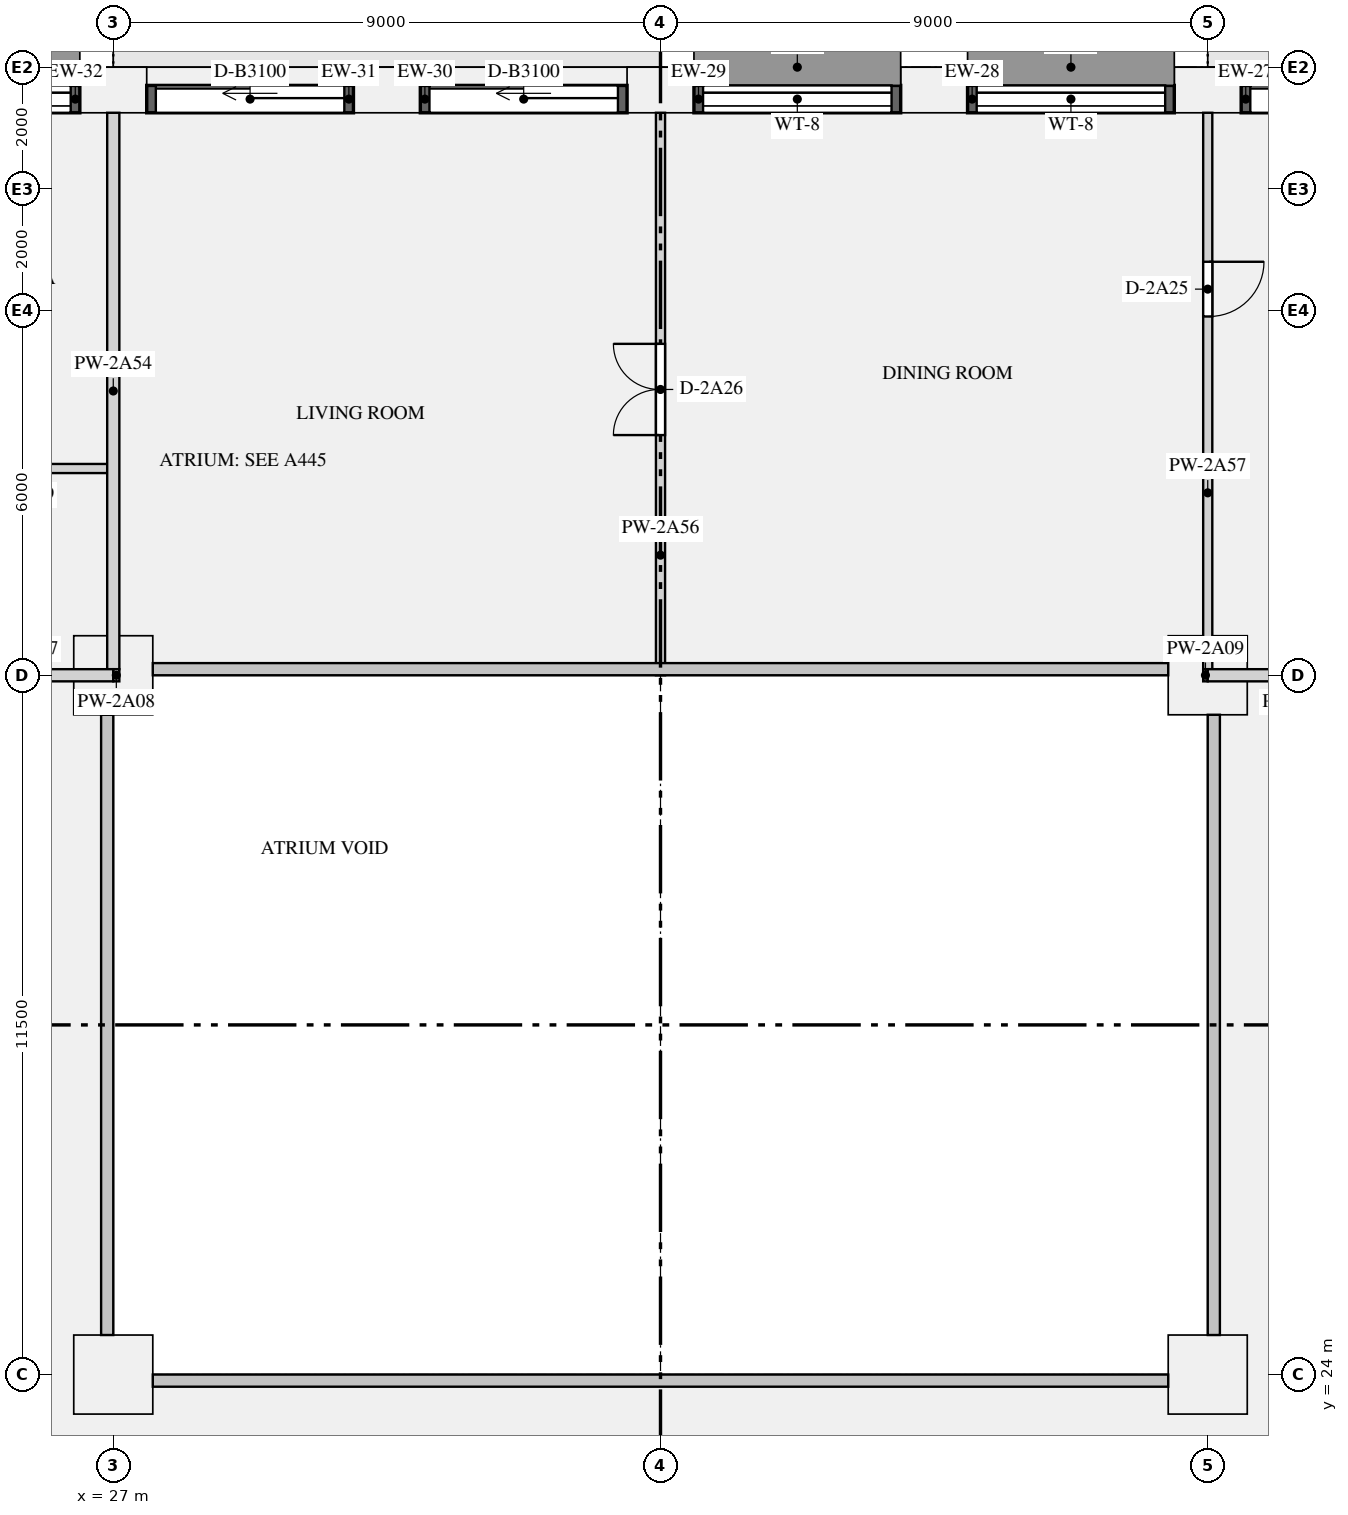
"""IFC4 building model, lengths in metres.
Left out: names, types, materials, properties, quantities, classifications, styles, units other than length and angle.
Written with IfcOpenShell. Run it as: python <this file> out.ifc"""

import sys

from ifc_helpers import new_model, si_unit, direction, frame, frame_2d, origin, origin_2d, place, context, subcontext, project, spatial, rectangle, extrude, element, fill, save


model = new_model("IFC4")
c1 = context("Model", 3, precision=1e-05, world=origin(), true_north=direction((0.0, 1.0)))
c2 = subcontext(c1, "Body", "Model", "MODEL_VIEW")
j1 = project(units=[si_unit("LENGTHUNIT", "METRE"), si_unit("PLANEANGLEUNIT", "RADIAN")], contexts=[c1])
p1 = place(None, origin())
s1 = spatial("IfcSite", under=j1, at=p1, CompositionType="ELEMENT")
p2 = place(p1, origin())
s2 = spatial("IfcBuilding", under=s1, at=p2, CompositionType="ELEMENT")
p3 = place(p2, frame((0.0, 0.0, 83.55)))
s3 = spatial("IfcBuildingStorey", under=s2, at=p3, CompositionType="ELEMENT", Elevation=83.55)
for number, where, z_axis, x_axis in (
    (1, (45.0, 45.125, 0.0), (0.0, 0.0, 1.0), (-1.0, 0.0, 0.0)),
    (2, (40.5, 45.125, 0.0), (0.0, 0.0, 1.0), (-1.0, 0.0, 0.0)),
    (3, (36.0, 45.125, 0.0), (0.0, 0.0, 1.0), (-1.0, 0.0, 0.0)),
    (4, (31.5, 45.125, 0.0), (0.0, 0.0, 1.0), (-1.0, 0.0, 0.0)),
    (5, (27.0, 45.125, 0.0), (0.0, 0.0, 1.0), (-1.0, 0.0, 0.0)),
):
    element("IfcColumn", number, at=place(p3, frame(where, z_axis=z_axis, x_axis=x_axis)), inside=s3, PredefinedType="USERDEFINED", context=c2, shape_type="SweptSolid", body=[
        extrude(rectangle(XDim=1.1, YDim=0.75, at=origin_2d()), origin(), (0.0, 0.0, 1.0), 3.15),
    ])
for number, where, z_axis, x_axis in (
    (6, (27.0, 24.0, 0.0), (0.0, 0.0, 1.0), (1.0, 0.0, 0.0)),
    (7, (45.0, 24.0, 0.0), (0.0, 0.0, 1.0), (1.0, 0.0, 0.0)),
    (8, (27.0, 35.5, 0.0), (0.0, 0.0, 1.0), (1.0, 0.0, 0.0)),
    (9, (45.0, 35.5, 0.0), (0.0, 0.0, 1.0), (1.0, 0.0, 0.0)),
):
    element("IfcColumn", number, at=place(p3, frame(where, z_axis=z_axis, x_axis=x_axis)), inside=s3, PredefinedType="COLUMN", context=c2, shape_type="SweptSolid", body=[
        extrude(rectangle(XDim=1.3, YDim=1.3, at=origin_2d()), origin(), (0.0, 0.0, 1.0), 3.15),
    ])
p4 = place(p3, frame((48.95, 44.975, 0.0), z_axis=(0.0, 0.0, 1.0), x_axis=(-1.0, 0.0, 0.0)))
e10 = element("IfcWall", 10, at=p4, inside=s3, PredefinedType="SOLIDWALL", context=c2, shape_type="SweptSolid", body=[
    extrude(rectangle(XDim=3.4, YDim=0.45, at=frame_2d((1.7, 0.0))), origin(), (0.0, 0.0, 1.0), 2.83),
])
p5 = place(p4, frame((0.15, 0.0, 0.0)))
e11 = element("IfcOpeningElement", 11, at=p5, cuts=e10, PredefinedType="OPENING", context=c2, shape_type="SweptSolid", body=[
    extrude(rectangle(XDim=3.1, YDim=2.3, at=frame_2d((1.55, 1.15))), frame((0.0, 0.235, 0.0), z_axis=(0.0, -1.0, 0.0), x_axis=(1.0, 0.0, 0.0)), (0.0, 0.0, 1.0), 0.47),
])
p6 = place(p3, frame((44.45, 44.975, 0.9), z_axis=(0.0, 0.0, 1.0), x_axis=(-1.0, 0.0, 0.0)))
e12 = element("IfcWall", 12, at=p6, inside=s3, PredefinedType="SOLIDWALL", context=c2, shape_type="SweptSolid", body=[
    extrude(rectangle(XDim=3.4, YDim=0.45, at=frame_2d((1.7, 0.0))), origin(), (0.0, 0.0, 1.0), 1.93),
])
p7 = place(p6, frame((0.15, 0.0, 0.15)))
e13 = element("IfcOpeningElement", 13, at=p7, cuts=e12, PredefinedType="OPENING", context=c2, shape_type="SweptSolid", body=[
    extrude(rectangle(XDim=3.1, YDim=1.5, at=frame_2d((1.55, 0.75))), frame((0.0, 0.235, 0.0), z_axis=(0.0, -1.0, 0.0), x_axis=(1.0, 0.0, 0.0)), (0.0, 0.0, 1.0), 0.47),
])
p8 = place(p3, frame((39.95, 44.975, 0.9), z_axis=(0.0, 0.0, 1.0), x_axis=(-1.0, 0.0, 0.0)))
e14 = element("IfcWall", 14, at=p8, inside=s3, PredefinedType="SOLIDWALL", context=c2, shape_type="SweptSolid", body=[
    extrude(rectangle(XDim=3.4, YDim=0.45, at=frame_2d((1.7, 0.0))), origin(), (0.0, 0.0, 1.0), 1.93),
])
p9 = place(p8, frame((0.15, 0.0, 0.15)))
e15 = element("IfcOpeningElement", 15, at=p9, cuts=e14, PredefinedType="OPENING", context=c2, shape_type="SweptSolid", body=[
    extrude(rectangle(XDim=3.1, YDim=1.5, at=frame_2d((1.55, 0.75))), frame((0.0, 0.235, 0.0), z_axis=(0.0, -1.0, 0.0), x_axis=(1.0, 0.0, 0.0)), (0.0, 0.0, 1.0), 0.47),
])
p10 = place(p3, frame((35.45, 44.975, 0.0), z_axis=(0.0, 0.0, 1.0), x_axis=(-1.0, 0.0, 0.0)))
e16 = element("IfcWall", 16, at=p10, inside=s3, PredefinedType="SOLIDWALL", context=c2, shape_type="SweptSolid", body=[
    extrude(rectangle(XDim=3.4, YDim=0.45, at=frame_2d((1.7, 0.0))), origin(), (0.0, 0.0, 1.0), 2.83),
])
p11 = place(p10, frame((0.15, 0.0, 0.0)))
e17 = element("IfcOpeningElement", 17, at=p11, cuts=e16, PredefinedType="OPENING", context=c2, shape_type="SweptSolid", body=[
    extrude(rectangle(XDim=3.1, YDim=2.3, at=frame_2d((1.55, 1.15))), frame((0.0, 0.235, 0.0), z_axis=(0.0, -1.0, 0.0), x_axis=(1.0, 0.0, 0.0)), (0.0, 0.0, 1.0), 0.47),
])
p12 = place(p3, frame((30.95, 44.975, 0.0), z_axis=(0.0, 0.0, 1.0), x_axis=(-1.0, 0.0, 0.0)))
e18 = element("IfcWall", 18, at=p12, inside=s3, PredefinedType="SOLIDWALL", context=c2, shape_type="SweptSolid", body=[
    extrude(rectangle(XDim=3.4, YDim=0.45, at=frame_2d((1.7, 0.0))), origin(), (0.0, 0.0, 1.0), 2.83),
])
p13 = place(p12, frame((0.15, 0.0, 0.0)))
e19 = element("IfcOpeningElement", 19, at=p13, cuts=e18, PredefinedType="OPENING", context=c2, shape_type="SweptSolid", body=[
    extrude(rectangle(XDim=3.1, YDim=2.3, at=frame_2d((1.55, 1.15))), frame((0.0, 0.235, 0.0), z_axis=(0.0, -1.0, 0.0), x_axis=(1.0, 0.0, 0.0)), (0.0, 0.0, 1.0), 0.47),
])
p14 = place(p3, frame((26.45, 44.975, 0.9), z_axis=(0.0, 0.0, 1.0), x_axis=(-1.0, 0.0, 0.0)))
e20 = element("IfcWall", 20, at=p14, inside=s3, PredefinedType="SOLIDWALL", context=c2, shape_type="SweptSolid", body=[
    extrude(rectangle(XDim=3.4, YDim=0.45, at=frame_2d((1.7, 0.0))), origin(), (0.0, 0.0, 1.0), 1.93),
])
p15 = place(p14, frame((0.15, 0.0, 0.15)))
e21 = element("IfcOpeningElement", 21, at=p15, cuts=e20, PredefinedType="OPENING", context=c2, shape_type="SweptSolid", body=[
    extrude(rectangle(XDim=3.1, YDim=1.5, at=frame_2d((1.55, 0.75))), frame((0.0, 0.235, 0.0), z_axis=(0.0, -1.0, 0.0), x_axis=(1.0, 0.0, 0.0)), (0.0, 0.0, 1.0), 0.47),
])
p16 = place(p3, frame((23.9, 35.5, 0.0), z_axis=(0.0, 0.0, 1.0), x_axis=(1.0, 0.0, 0.0)))
e22 = element("IfcWall", 22, at=p16, inside=s3, PredefinedType="PARTITIONING", context=c2, shape_type="SweptSolid", body=[
    extrude(rectangle(XDim=3.1, YDim=0.2, at=frame_2d((1.55, 0.0))), origin(), (0.0, 0.0, 1.0), 2.83),
])
p17 = place(p3, frame((27.0, 35.5, 0.0), z_axis=(0.0, 0.0, 1.0), x_axis=(1.0, 0.0, 0.0)))
e23 = element("IfcWall", 23, at=p17, inside=s3, PredefinedType="PARTITIONING", context=c2, shape_type="SweptSolid", body=[
    extrude(rectangle(XDim=0.1, YDim=0.2, at=frame_2d((0.05, 0.0))), origin(), (0.0, 0.0, 1.0), 2.83),
])
p18 = place(p3, frame((44.925, 35.5, 0.0), z_axis=(0.0, 0.0, 1.0), x_axis=(1.0, 0.0, 0.0)))
e24 = element("IfcWall", 24, at=p18, inside=s3, PredefinedType="PARTITIONING", context=c2, shape_type="SweptSolid", body=[
    extrude(rectangle(XDim=0.075, YDim=0.2, at=frame_2d((0.038, 0.0))), origin(), (0.0, 0.0, 1.0), 2.83),
])
p19 = place(p3, frame((45.0, 35.5, 0.0), z_axis=(0.0, 0.0, 1.0), x_axis=(1.0, 0.0, 0.0)))
e25 = element("IfcWall", 25, at=p19, inside=s3, PredefinedType="PARTITIONING", context=c2, shape_type="SweptSolid", body=[
    extrude(rectangle(XDim=3.075, YDim=0.2, at=frame_2d((1.538, 0.0))), origin(), (0.0, 0.0, 1.0), 2.83),
])
p20 = place(p3, frame((12.125, 38.9, 0.0), z_axis=(0.0, 0.0, 1.0), x_axis=(1.0, 0.0, 0.0)))
e26 = element("IfcWall", 26, at=p20, inside=s3, PredefinedType="PARTITIONING", context=c2, shape_type="SweptSolid", body=[
    extrude(rectangle(XDim=14.775, YDim=0.15, at=frame_2d((7.387, 0.0))), origin(), (0.0, 0.0, 1.0), 2.83),
])
p21 = place(p20, frame((3.175, 0.0, 0.0)))
e27 = element("IfcOpeningElement", 27, at=p21, cuts=e26, PredefinedType="OPENING", context=c2, shape_type="SweptSolid", body=[
    extrude(rectangle(XDim=0.9, YDim=2.1, at=frame_2d((0.45, 1.05))), frame((0.0, 0.085, 0.0), z_axis=(0.0, -1.0, 0.0), x_axis=(1.0, 0.0, 0.0)), (0.0, 0.0, 1.0), 0.17),
])
p22 = place(p20, frame((12.925, 0.0, 0.0)))
e28 = element("IfcOpeningElement", 28, at=p22, cuts=e26, PredefinedType="OPENING", context=c2, shape_type="SweptSolid", body=[
    extrude(rectangle(XDim=0.9, YDim=2.1, at=frame_2d((0.45, 1.05))), frame((0.0, 0.085, 0.0), z_axis=(0.0, -1.0, 0.0), x_axis=(1.0, 0.0, 0.0)), (0.0, 0.0, 1.0), 0.17),
])
p23 = place(p3, frame((27.0, 35.6, 0.0), z_axis=(0.0, 0.0, 1.0), x_axis=(0.0, 1.0, 0.0)))
e29 = element("IfcWall", 29, at=p23, inside=s3, PredefinedType="PARTITIONING", context=c2, shape_type="SweptSolid", body=[
    extrude(rectangle(XDim=9.15, YDim=0.2, at=frame_2d((4.575, 0.0))), origin(), (0.0, 0.0, 1.0), 2.83),
])
p24 = place(p3, frame((36.0, 35.5, 0.0), z_axis=(0.0, 0.0, 1.0), x_axis=(0.0, 1.0, 0.0)))
e30 = element("IfcWall", 30, at=p24, inside=s3, PredefinedType="PARTITIONING", context=c2, shape_type="SweptSolid", body=[
    extrude(rectangle(XDim=9.25, YDim=0.15, at=frame_2d((4.625, 0.0))), origin(), (0.0, 0.0, 1.0), 2.83),
])
p25 = place(p24, frame((3.95, 0.0, 0.0)))
e31 = element("IfcOpeningElement", 31, at=p25, cuts=e30, PredefinedType="OPENING", context=c2, shape_type="SweptSolid", body=[
    extrude(rectangle(XDim=1.5, YDim=2.1, at=frame_2d((0.75, 1.05))), frame((0.0, 0.085, 0.0), z_axis=(0.0, -1.0, 0.0), x_axis=(1.0, 0.0, 0.0)), (0.0, 0.0, 1.0), 0.17),
])
p26 = place(p3, frame((45.0, 35.6, 0.0), z_axis=(0.0, 0.0, 1.0), x_axis=(0.0, 1.0, 0.0)))
e32 = element("IfcWall", 32, at=p26, inside=s3, PredefinedType="PARTITIONING", context=c2, shape_type="SweptSolid", body=[
    extrude(rectangle(XDim=9.15, YDim=0.15, at=frame_2d((4.575, 0.0))), origin(), (0.0, 0.0, 1.0), 2.83),
])
p27 = place(p26, frame((5.8, 0.0, 0.0)))
e33 = element("IfcOpeningElement", 33, at=p27, cuts=e32, PredefinedType="OPENING", context=c2, shape_type="SweptSolid", body=[
    extrude(rectangle(XDim=0.9, YDim=2.1, at=frame_2d((0.45, 1.05))), frame((0.0, 0.085, 0.0), z_axis=(0.0, -1.0, 0.0), x_axis=(1.0, 0.0, 0.0)), (0.0, 0.0, 1.0), 0.17),
])
p28 = place(p5, origin())
e34 = element("IfcDoor", 34, at=p28, inside=s3, OperationType="SLIDING_TO_LEFT", PredefinedType="DOOR", context=c2, shape_type="SweptSolid", body=[
    extrude(rectangle(XDim=3.1, YDim=2.3, at=frame_2d((1.55, 1.15))), frame((0.0, -0.07, 0.0), z_axis=(0.0, -1.0, 0.0), x_axis=(1.0, 0.0, 0.0)), (0.0, 0.0, 1.0), 0.05),
])
fill(e11, e34)
p29 = place(p7, origin())
e35 = element("IfcWindow", 35, at=p29, inside=s3, PartitioningType="SINGLE_PANEL", PredefinedType="WINDOW", context=c2, shape_type="SweptSolid", body=[
    extrude(rectangle(XDim=3.1, YDim=1.5, at=frame_2d((1.55, 0.75))), frame((0.0, -0.065, 0.0), z_axis=(0.0, -1.0, 0.0), x_axis=(1.0, 0.0, 0.0)), (0.0, 0.0, 1.0), 0.06),
])
fill(e13, e35)
p30 = place(p9, origin())
e36 = element("IfcWindow", 36, at=p30, inside=s3, PartitioningType="SINGLE_PANEL", PredefinedType="WINDOW", context=c2, shape_type="SweptSolid", body=[
    extrude(rectangle(XDim=3.1, YDim=1.5, at=frame_2d((1.55, 0.75))), frame((0.0, -0.065, 0.0), z_axis=(0.0, -1.0, 0.0), x_axis=(1.0, 0.0, 0.0)), (0.0, 0.0, 1.0), 0.06),
])
fill(e15, e36)
p31 = place(p11, origin())
e37 = element("IfcDoor", 37, at=p31, inside=s3, OperationType="SLIDING_TO_LEFT", PredefinedType="DOOR", context=c2, shape_type="SweptSolid", body=[
    extrude(rectangle(XDim=3.1, YDim=2.3, at=frame_2d((1.55, 1.15))), frame((0.0, -0.07, 0.0), z_axis=(0.0, -1.0, 0.0), x_axis=(1.0, 0.0, 0.0)), (0.0, 0.0, 1.0), 0.05),
])
fill(e17, e37)
p32 = place(p13, origin())
e38 = element("IfcDoor", 38, at=p32, inside=s3, OperationType="SLIDING_TO_LEFT", PredefinedType="DOOR", context=c2, shape_type="SweptSolid", body=[
    extrude(rectangle(XDim=3.1, YDim=2.3, at=frame_2d((1.55, 1.15))), frame((0.0, -0.07, 0.0), z_axis=(0.0, -1.0, 0.0), x_axis=(1.0, 0.0, 0.0)), (0.0, 0.0, 1.0), 0.05),
])
fill(e19, e38)
p33 = place(p15, origin())
e39 = element("IfcWindow", 39, at=p33, inside=s3, PartitioningType="SINGLE_PANEL", PredefinedType="WINDOW", context=c2, shape_type="SweptSolid", body=[
    extrude(rectangle(XDim=3.1, YDim=1.5, at=frame_2d((1.55, 0.75))), frame((0.0, -0.065, 0.0), z_axis=(0.0, -1.0, 0.0), x_axis=(1.0, 0.0, 0.0)), (0.0, 0.0, 1.0), 0.06),
])
fill(e21, e39)
p34 = place(p27, frame((0.9, 0.0, 0.0), z_axis=(0.0, 0.0, 1.0), x_axis=(-1.0, 0.0, 0.0)))
e40 = element("IfcDoor", 40, at=p34, inside=s3, OperationType="SINGLE_SWING_LEFT", PredefinedType="DOOR", context=c2, shape_type="SweptSolid", body=[
    extrude(rectangle(XDim=0.9, YDim=2.1, at=frame_2d((0.45, 1.05))), frame((0.0, 0.025, 0.0), z_axis=(0.0, -1.0, 0.0), x_axis=(1.0, 0.0, 0.0)), (0.0, 0.0, 1.0), 0.05),
])
fill(e33, e40)
p35 = place(p25, origin())
e41 = element("IfcDoor", 41, at=p35, inside=s3, OperationType="DOUBLE_DOOR_SINGLE_SWING", PredefinedType="DOOR", context=c2, shape_type="SweptSolid", body=[
    extrude(rectangle(XDim=1.5, YDim=2.1, at=frame_2d((0.75, 1.05))), frame((0.0, 0.025, 0.0), z_axis=(0.0, -1.0, 0.0), x_axis=(1.0, 0.0, 0.0)), (0.0, 0.0, 1.0), 0.05),
])
fill(e31, e41)
save(model, sys.argv[1])
